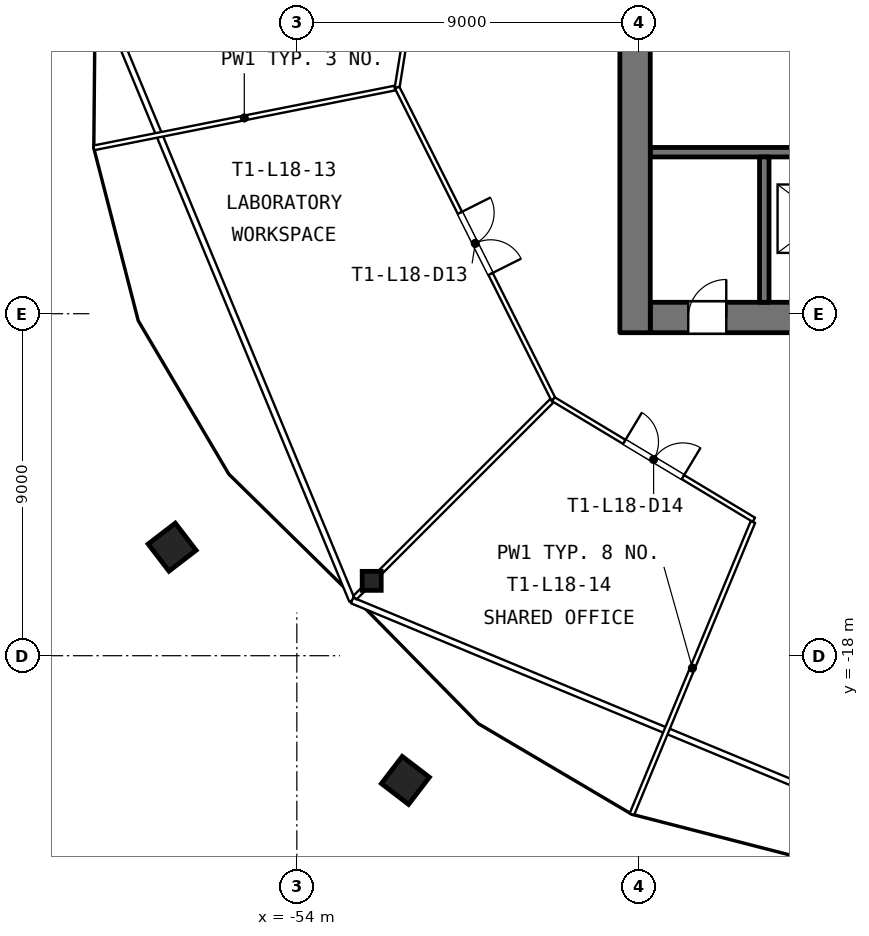
"""IFC4 building model, lengths in metres.
Left out: names, types, materials, properties, quantities, classifications, styles, units other than length and angle.
Written with IfcOpenShell. Run it as: python <this file> out.ifc"""

import sys

from ifc_helpers import new_model, si_unit, direction, frame, frame_2d, origin, origin_2d, place, context, subcontext, project, spatial, rectangle, hollow_rectangle, extrude, element, fill, save


model = new_model("IFC4")
c1 = context("Model", 3, precision=1e-05, world=origin(), true_north=direction((0.0, 1.0)))
c2 = subcontext(c1, "Body", "Model", "MODEL_VIEW")
j1 = project(units=[si_unit("LENGTHUNIT", "METRE"), si_unit("PLANEANGLEUNIT", "RADIAN")], contexts=[c1])
p1 = place(None, origin())
s1 = spatial("IfcSite", under=j1, at=p1, CompositionType="ELEMENT")
p2 = place(p1, origin())
s2 = spatial("IfcBuilding", under=s1, at=p2, CompositionType="ELEMENT")
p3 = place(p2, frame((0.0, 0.0, 80.1)))
s3 = spatial("IfcBuildingStorey", under=s2, at=p3, CompositionType="ELEMENT", Elevation=80.1)
p4 = place(p3, frame((-52.03, -16.03, 0.0), z_axis=(0.0, 0.0, 1.0), x_axis=(1.0, 0.0, 0.0)))
e1 = element("IfcColumn", 1, at=p4, inside=s3, PredefinedType="COLUMN", context=c2, shape_type="SweptSolid", body=[
    extrude(hollow_rectangle(XDim=0.5, YDim=0.5, WallThickness=0.03, at=origin_2d()), origin(), (0.0, 0.0, 1.0), 3.9),
])
p5 = place(p3, frame((-44.7, -9.1, 0.0), z_axis=(0.0, 0.0, 1.0), x_axis=(1.0, 0.0, 0.0)))
e2 = element("IfcWall", 2, at=p5, inside=s3, PredefinedType="SHEAR", context=c2, shape_type="SweptSolid", body=[
    extrude(rectangle(XDim=17.4, YDim=0.8, at=frame_2d((8.7, 0.0))), origin(), (0.0, 0.0, 1.0), 3.6),
])
p6 = place(p5, frame((7.3, 0.0, 0.0)))
e3 = element("IfcOpeningElement", 3, at=p6, cuts=e2, PredefinedType="OPENING", context=c2, shape_type="SweptSolid", body=[
    extrude(rectangle(XDim=1.2, YDim=2.1, at=frame_2d((0.6, 1.05))), frame((0.0, 0.41, 0.0), z_axis=(0.0, -1.0, 0.0), x_axis=(1.0, 0.0, 0.0)), (0.0, 0.0, 1.0), 0.82),
])
p7 = place(p5, frame((1.0, 0.0, 0.0)))
e4 = element("IfcOpeningElement", 4, at=p7, cuts=e2, PredefinedType="OPENING", context=c2, shape_type="SweptSolid", body=[
    extrude(rectangle(XDim=1.0, YDim=2.1, at=frame_2d((0.5, 1.05))), frame((0.0, 0.41, 0.0), z_axis=(0.0, -1.0, 0.0), x_axis=(1.0, 0.0, 0.0)), (0.0, 0.0, 1.0), 0.82),
])
p8 = place(p3, frame((-44.7, -4.75, 0.0), z_axis=(0.0, 0.0, 1.0), x_axis=(1.0, 0.0, 0.0)))
e5 = element("IfcWall", 5, at=p8, inside=s3, PredefinedType="SHEAR", context=c2, shape_type="SweptSolid", body=[
    extrude(rectangle(XDim=17.4, YDim=0.25, at=frame_2d((8.7, 0.0))), origin(), (0.0, 0.0, 1.0), 3.6),
])
p9 = place(p3, frame((-45.1, -9.5, 0.0), z_axis=(0.0, 0.0, 1.0), x_axis=(0.0, 1.0, 0.0)))
e6 = element("IfcWall", 6, at=p9, inside=s3, PredefinedType="SHEAR", context=c2, shape_type="SweptSolid", body=[
    extrude(rectangle(XDim=19.0, YDim=0.8, at=frame_2d((9.5, 0.0))), origin(), (0.0, 0.0, 1.0), 3.6),
])
p10 = place(p9, frame((8.3, 0.0, 0.0)))
e7 = element("IfcOpeningElement", 7, at=p10, cuts=e6, PredefinedType="OPENING", context=c2, shape_type="SweptSolid", body=[
    extrude(rectangle(XDim=2.4, YDim=2.1, at=frame_2d((1.2, 1.05))), frame((0.0, 0.41, 0.0), z_axis=(0.0, -1.0, 0.0), x_axis=(1.0, 0.0, 0.0)), (0.0, 0.0, 1.0), 0.82),
])
p11 = place(p3, frame((-41.7, -8.7, 0.0), z_axis=(0.0, 0.0, 1.0), x_axis=(0.0, 1.0, 0.0)))
e8 = element("IfcWall", 8, at=p11, inside=s3, PredefinedType="SHEAR", context=c2, shape_type="SweptSolid", body=[
    extrude(rectangle(XDim=3.825, YDim=0.25, at=frame_2d((1.913, 0.0))), origin(), (0.0, 0.0, 1.0), 3.6),
])
p12 = place(p3, frame((-59.344, -4.636, 0.0), z_axis=(0.0, 0.0, 1.0), x_axis=(0.980844858088, 0.194790565382, 0.0)))
e9 = element("IfcWall", 9, at=p12, inside=s3, PredefinedType="PARTITIONING", context=c2, shape_type="SweptSolid", body=[
    extrude(rectangle(XDim=8.077, YDim=0.125, at=frame_2d((4.038, 0.0))), origin(), (0.0, 0.0, 1.0), 2.4),
])
p13 = place(p3, frame((-52.475, -16.475, 0.0), z_axis=(0.0, 0.0, 1.0), x_axis=(0.707106781187, 0.707106781187, 0.0)))
e10 = element("IfcWall", 10, at=p13, inside=s3, PredefinedType="PARTITIONING", context=c2, shape_type="SweptSolid", body=[
    extrude(rectangle(XDim=7.327, YDim=0.125, at=frame_2d((3.663, 0.0))), origin(), (0.0, 0.0, 1.0), 2.4),
])
p14 = place(p3, frame((-45.184, -22.173, 0.0), z_axis=(0.0, 0.0, 1.0), x_axis=(0.3826720415, 0.92388425068, 0.0)))
e11 = element("IfcWall", 11, at=p14, inside=s3, PredefinedType="PARTITIONING", context=c2, shape_type="SweptSolid", body=[
    extrude(rectangle(XDim=8.326, YDim=0.125, at=frame_2d((4.163, 0.0))), origin(), (0.0, 0.0, 1.0), 2.4),
])
p15 = place(p3, frame((-49.434, 8.983, 0.0), z_axis=(0.0, 0.0, 1.0), x_axis=(-0.158089733584, -0.987424749606, 0.0)))
e12 = element("IfcWall", 12, at=p15, inside=s3, PredefinedType="PARTITIONING", context=c2, shape_type="SweptSolid", body=[
    extrude(rectangle(XDim=12.186, YDim=0.125, at=frame_2d((6.093, 0.0))), origin(), (0.0, 0.0, 1.0), 3.0),
])
p16 = place(p15, frame((5.193, 0.0, 0.0)))
e13 = element("IfcOpeningElement", 13, at=p16, cuts=e12, PredefinedType="OPENING", context=c2, shape_type="SweptSolid", body=[
    extrude(rectangle(XDim=1.8, YDim=2.1, at=frame_2d((0.9, 1.05))), frame((0.0, 0.073, 0.0), z_axis=(0.0, -1.0, 0.0), x_axis=(1.0, 0.0, 0.0)), (0.0, 0.0, 1.0), 0.145),
])
p17 = place(p3, frame((-51.361, -3.05, 0.0), z_axis=(0.0, 0.0, 1.0), x_axis=(0.448150268207, -0.893958241254, 0.0)))
e14 = element("IfcWall", 14, at=p17, inside=s3, PredefinedType="PARTITIONING", context=c2, shape_type="SweptSolid", body=[
    extrude(rectangle(XDim=9.172, YDim=0.125, at=frame_2d((4.586, 0.0))), origin(), (0.0, 0.0, 1.0), 3.0),
])
p18 = place(p17, frame((3.686, 0.0, 0.0)))
e15 = element("IfcOpeningElement", 15, at=p18, cuts=e14, PredefinedType="OPENING", context=c2, shape_type="SweptSolid", body=[
    extrude(rectangle(XDim=1.8, YDim=2.1, at=frame_2d((0.9, 1.05))), frame((0.0, 0.073, 0.0), z_axis=(0.0, -1.0, 0.0), x_axis=(1.0, 0.0, 0.0)), (0.0, 0.0, 1.0), 0.145),
])
p19 = place(p3, frame((-47.25, -11.25, 0.0), z_axis=(0.0, 0.0, 1.0), x_axis=(0.856985133989, -0.515341129856, 0.0)))
e16 = element("IfcWall", 16, at=p19, inside=s3, PredefinedType="PARTITIONING", context=c2, shape_type="SweptSolid", body=[
    extrude(rectangle(XDim=6.156, YDim=0.125, at=frame_2d((3.078, 0.0))), origin(), (0.0, 0.0, 1.0), 3.0),
])
p20 = place(p19, frame((2.178, 0.0, 0.0)))
e17 = element("IfcOpeningElement", 17, at=p20, cuts=e16, PredefinedType="OPENING", context=c2, shape_type="SweptSolid", body=[
    extrude(rectangle(XDim=1.8, YDim=2.1, at=frame_2d((0.9, 1.05))), frame((0.0, 0.073, 0.0), z_axis=(0.0, -1.0, 0.0), x_axis=(1.0, 0.0, 0.0)), (0.0, 0.0, 1.0), 0.145),
])
p21 = place(p7, origin())
e18 = element("IfcDoor", 18, at=p21, inside=s3, OperationType="SINGLE_SWING_RIGHT", PredefinedType="DOOR", context=c2, shape_type="SweptSolid", body=[
    extrude(rectangle(XDim=1.0, YDim=2.1, at=frame_2d((0.5, 1.05))), frame((0.0, 0.275, 0.0), z_axis=(0.0, -1.0, 0.0), x_axis=(1.0, 0.0, 0.0)), (0.0, 0.0, 1.0), 0.05),
])
fill(e4, e18)
p22 = place(p18, origin())
e19 = element("IfcDoor", 19, at=p22, inside=s3, OperationType="DOUBLE_DOOR_DOUBLE_SWING", PredefinedType="DOOR", context=c2, shape_type="SweptSolid", body=[
    extrude(rectangle(XDim=1.8, YDim=2.1, at=frame_2d((0.9, 1.05))), frame((0.0, 0.025, 0.0), z_axis=(0.0, -1.0, 0.0), x_axis=(1.0, 0.0, 0.0)), (0.0, 0.0, 1.0), 0.05),
])
fill(e15, e19)
p23 = place(p20, origin())
e20 = element("IfcDoor", 20, at=p23, inside=s3, OperationType="DOUBLE_DOOR_DOUBLE_SWING", PredefinedType="DOOR", context=c2, shape_type="SweptSolid", body=[
    extrude(rectangle(XDim=1.8, YDim=2.1, at=frame_2d((0.9, 1.05))), frame((0.0, 0.025, 0.0), z_axis=(0.0, -1.0, 0.0), x_axis=(1.0, 0.0, 0.0)), (0.0, 0.0, 1.0), 0.05),
])
fill(e17, e20)
save(model, sys.argv[1])
